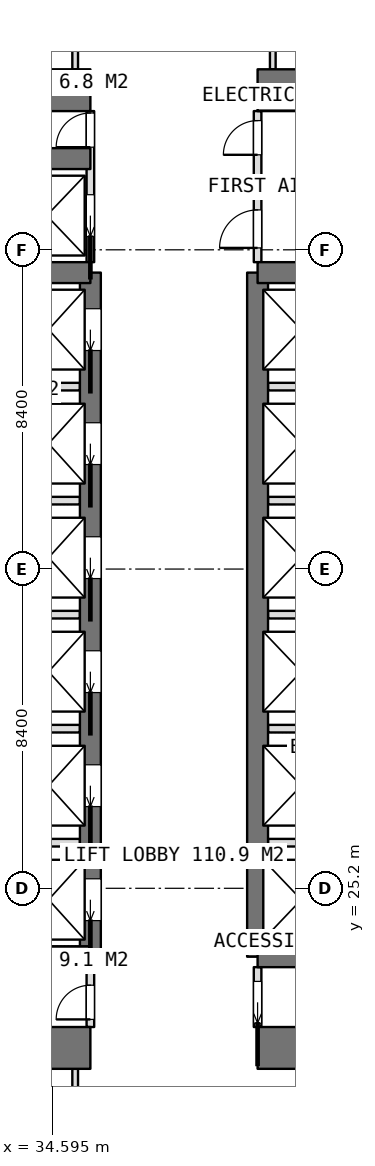
"""IFC4 building model, lengths in metres.
Left out: names, types, materials, properties, quantities, classifications, styles, units other than length and angle.
Written with IfcOpenShell. Run it as: python <this file> out.ifc"""

import sys

from ifc_helpers import new_model, si_unit, direction, frame, frame_2d, origin, place, context, subcontext, project, spatial, rectangle, extrude, element, fill, save


model = new_model("IFC4")
c1 = context("Model", 3, precision=1e-05, world=origin(), true_north=direction((0.0, 1.0)))
c2 = subcontext(c1, "Body", "Model", "MODEL_VIEW")
j1 = project(units=[si_unit("LENGTHUNIT", "METRE"), si_unit("PLANEANGLEUNIT", "RADIAN")], contexts=[c1])
p1 = place(None, origin())
s1 = spatial("IfcSite", under=j1, at=p1, CompositionType="ELEMENT")
p2 = place(p1, origin())
s2 = spatial("IfcBuilding", under=s1, at=p2, CompositionType="ELEMENT")
p3 = place(p2, frame((0.0, 0.0, 70.4)))
s3 = spatial("IfcBuildingStorey", under=s2, at=p3, CompositionType="ELEMENT", Elevation=70.4)
p4 = place(p3, frame((25.2, 21.0, 0.0), z_axis=(0.0, 0.0, 1.0), x_axis=(1.0, 0.0, 0.0)))
e1 = element("IfcWall", 1, at=p4, inside=s3, PredefinedType="SHEAR", context=c2, shape_type="SweptSolid", body=[
    extrude(rectangle(XDim=10.4, YDim=1.1, at=frame_2d((5.2, 0.0))), origin(), (0.0, 0.0, 1.0), 3.75),
])
p5 = place(p3, frame((40.0, 21.0, 0.0), z_axis=(0.0, 0.0, 1.0), x_axis=(1.0, 0.0, 0.0)))
e2 = element("IfcWall", 2, at=p5, inside=s3, PredefinedType="SHEAR", context=c2, shape_type="SweptSolid", body=[
    extrude(rectangle(XDim=10.4, YDim=1.1, at=frame_2d((5.2, 0.0))), origin(), (0.0, 0.0, 1.0), 3.75),
])
p6 = place(p3, frame((25.2, 46.2, 0.0), z_axis=(0.0, 0.0, 1.0), x_axis=(1.0, 0.0, 0.0)))
e3 = element("IfcWall", 3, at=p6, inside=s3, PredefinedType="SHEAR", context=c2, shape_type="SweptSolid", body=[
    extrude(rectangle(XDim=10.4, YDim=1.1, at=frame_2d((5.2, 0.0))), origin(), (0.0, 0.0, 1.0), 3.75),
])
p7 = place(p3, frame((40.0, 46.2, 0.0), z_axis=(0.0, 0.0, 1.0), x_axis=(1.0, 0.0, 0.0)))
e4 = element("IfcWall", 4, at=p7, inside=s3, PredefinedType="SHEAR", context=c2, shape_type="SweptSolid", body=[
    extrude(rectangle(XDim=10.4, YDim=1.1, at=frame_2d((5.2, 0.0))), origin(), (0.0, 0.0, 1.0), 3.75),
])
p8 = place(p3, frame((35.6, 23.4, 0.0), z_axis=(0.0, 0.0, 1.0), x_axis=(0.0, 1.0, 0.0)))
e5 = element("IfcWall", 5, at=p8, inside=s3, PredefinedType="SHEAR", context=c2, shape_type="SweptSolid", body=[
    extrude(rectangle(XDim=18.0, YDim=0.55, at=frame_2d((9.0, 0.0))), origin(), (0.0, 0.0, 1.0), 3.75),
])
p9 = place(p8, frame((0.95, 0.0, 0.0)))
e6 = element("IfcOpeningElement", 6, at=p9, cuts=e5, PredefinedType="OPENING", context=c2, shape_type="SweptSolid", body=[
    extrude(rectangle(XDim=1.1, YDim=2.1, at=frame_2d((0.55, 1.05))), frame((0.0, 0.285, 0.0), z_axis=(0.0, -1.0, 0.0), x_axis=(1.0, 0.0, 0.0)), (0.0, 0.0, 1.0), 0.57),
])
p10 = place(p8, frame((3.95, 0.0, 0.0)))
e7 = element("IfcOpeningElement", 7, at=p10, cuts=e5, PredefinedType="OPENING", context=c2, shape_type="SweptSolid", body=[
    extrude(rectangle(XDim=1.1, YDim=2.1, at=frame_2d((0.55, 1.05))), frame((0.0, 0.285, 0.0), z_axis=(0.0, -1.0, 0.0), x_axis=(1.0, 0.0, 0.0)), (0.0, 0.0, 1.0), 0.57),
])
p11 = place(p8, frame((6.95, 0.0, 0.0)))
e8 = element("IfcOpeningElement", 8, at=p11, cuts=e5, PredefinedType="OPENING", context=c2, shape_type="SweptSolid", body=[
    extrude(rectangle(XDim=1.1, YDim=2.1, at=frame_2d((0.55, 1.05))), frame((0.0, 0.285, 0.0), z_axis=(0.0, -1.0, 0.0), x_axis=(1.0, 0.0, 0.0)), (0.0, 0.0, 1.0), 0.57),
])
p12 = place(p8, frame((9.95, 0.0, 0.0)))
e9 = element("IfcOpeningElement", 9, at=p12, cuts=e5, PredefinedType="OPENING", context=c2, shape_type="SweptSolid", body=[
    extrude(rectangle(XDim=1.1, YDim=2.1, at=frame_2d((0.55, 1.05))), frame((0.0, 0.285, 0.0), z_axis=(0.0, -1.0, 0.0), x_axis=(1.0, 0.0, 0.0)), (0.0, 0.0, 1.0), 0.57),
])
p13 = place(p8, frame((12.95, 0.0, 0.0)))
e10 = element("IfcOpeningElement", 10, at=p13, cuts=e5, PredefinedType="OPENING", context=c2, shape_type="SweptSolid", body=[
    extrude(rectangle(XDim=1.1, YDim=2.1, at=frame_2d((0.55, 1.05))), frame((0.0, 0.285, 0.0), z_axis=(0.0, -1.0, 0.0), x_axis=(1.0, 0.0, 0.0)), (0.0, 0.0, 1.0), 0.57),
])
p14 = place(p8, frame((15.95, 0.0, 0.0)))
e11 = element("IfcOpeningElement", 11, at=p14, cuts=e5, PredefinedType="OPENING", context=c2, shape_type="SweptSolid", body=[
    extrude(rectangle(XDim=1.1, YDim=2.1, at=frame_2d((0.55, 1.05))), frame((0.0, 0.285, 0.0), z_axis=(0.0, -1.0, 0.0), x_axis=(1.0, 0.0, 0.0)), (0.0, 0.0, 1.0), 0.57),
])
p15 = place(p3, frame((40.0, 23.4, 0.0), z_axis=(0.0, 0.0, 1.0), x_axis=(0.0, 1.0, 0.0)))
e12 = element("IfcWall", 12, at=p15, inside=s3, PredefinedType="SHEAR", context=c2, shape_type="SweptSolid", body=[
    extrude(rectangle(XDim=18.0, YDim=0.55, at=frame_2d((9.0, 0.0))), origin(), (0.0, 0.0, 1.0), 3.75),
])
for number, where, z_axis, x_axis in (
    (13, (31.8, 23.4, 0.0), (0.0, 0.0, 1.0), (1.0, 0.0, 0.0)),
    (14, (31.8, 41.4, 0.0), (0.0, 0.0, 1.0), (1.0, 0.0, 0.0)),
    (15, (31.8, 44.4, 0.0), (0.0, 0.0, 1.0), (1.0, 0.0, 0.0)),
    (16, (40.0, 23.4, 0.0), (0.0, 0.0, 1.0), (1.0, 0.0, 0.0)),
    (17, (40.0, 41.4, 0.0), (0.0, 0.0, 1.0), (1.0, 0.0, 0.0)),
):
    element("IfcWall", number, at=place(p3, frame(where, z_axis=z_axis, x_axis=x_axis)), inside=s3, PredefinedType="SHEAR", context=c2, shape_type="SweptSolid", body=[
        extrude(rectangle(XDim=3.8, YDim=0.55, at=frame_2d((1.9, 0.0))), origin(), (0.0, 0.0, 1.0), 3.75),
    ])
for number, where, z_axis, x_axis in (
    (18, (32.075, 26.4, 0.0), (0.0, 0.0, 1.0), (1.0, 0.0, 0.0)),
    (19, (32.075, 29.4, 0.0), (0.0, 0.0, 1.0), (1.0, 0.0, 0.0)),
    (20, (32.075, 32.4, 0.0), (0.0, 0.0, 1.0), (1.0, 0.0, 0.0)),
    (21, (32.075, 35.4, 0.0), (0.0, 0.0, 1.0), (1.0, 0.0, 0.0)),
    (22, (32.075, 38.4, 0.0), (0.0, 0.0, 1.0), (1.0, 0.0, 0.0)),
    (23, (40.275, 26.4, 0.0), (0.0, 0.0, 1.0), (1.0, 0.0, 0.0)),
    (24, (40.275, 29.4, 0.0), (0.0, 0.0, 1.0), (1.0, 0.0, 0.0)),
    (25, (40.275, 32.4, 0.0), (0.0, 0.0, 1.0), (1.0, 0.0, 0.0)),
    (26, (40.275, 35.4, 0.0), (0.0, 0.0, 1.0), (1.0, 0.0, 0.0)),
    (27, (40.275, 38.4, 0.0), (0.0, 0.0, 1.0), (1.0, 0.0, 0.0)),
):
    element("IfcWall", number, at=place(p3, frame(where, z_axis=z_axis, x_axis=x_axis)), inside=s3, PredefinedType="PARTITIONING", context=c2, shape_type="SweptSolid", body=[
        extrude(rectangle(XDim=3.25, YDim=0.2, at=frame_2d((1.625, 0.0))), origin(), (0.0, 0.0, 1.0), 3.5),
    ])
p16 = place(p3, frame((40.0, 21.55, 0.0), z_axis=(0.0, 0.0, 1.0), x_axis=(0.0, 1.0, 0.0)))
e28 = element("IfcWall", 28, at=p16, inside=s3, PredefinedType="PARTITIONING", context=c2, shape_type="SweptSolid", body=[
    extrude(rectangle(XDim=1.575, YDim=0.2, at=frame_2d((0.788, 0.0))), origin(), (0.0, 0.0, 1.0), 3.5),
])
p17 = place(p16, frame((0.1, 0.0, 0.0)))
e29 = element("IfcOpeningElement", 29, at=p17, cuts=e28, PredefinedType="OPENING", context=c2, shape_type="SweptSolid", body=[
    extrude(rectangle(XDim=1.1, YDim=2.1, at=frame_2d((0.55, 1.05))), frame((0.0, 0.11, 0.0), z_axis=(0.0, -1.0, 0.0), x_axis=(1.0, 0.0, 0.0)), (0.0, 0.0, 1.0), 0.22),
])
p18 = place(p3, frame((40.0, 41.675, 0.0), z_axis=(0.0, 0.0, 1.0), x_axis=(0.0, 1.0, 0.0)))
e30 = element("IfcWall", 30, at=p18, inside=s3, PredefinedType="PARTITIONING", context=c2, shape_type="SweptSolid", body=[
    extrude(rectangle(XDim=3.975, YDim=0.2, at=frame_2d((1.987, 0.0))), origin(), (0.0, 0.0, 1.0), 3.5),
])
p19 = place(p18, frame((2.825, 0.0, 0.0)))
e31 = element("IfcOpeningElement", 31, at=p19, cuts=e30, PredefinedType="OPENING", context=c2, shape_type="SweptSolid", body=[
    extrude(rectangle(XDim=0.9, YDim=2.1, at=frame_2d((0.45, 1.05))), frame((0.0, 0.11, 0.0), z_axis=(0.0, -1.0, 0.0), x_axis=(1.0, 0.0, 0.0)), (0.0, 0.0, 1.0), 0.22),
])
p20 = place(p18, frame((0.375, 0.0, 0.0)))
e32 = element("IfcOpeningElement", 32, at=p20, cuts=e30, PredefinedType="OPENING", context=c2, shape_type="SweptSolid", body=[
    extrude(rectangle(XDim=1.0, YDim=2.1, at=frame_2d((0.5, 1.05))), frame((0.0, 0.11, 0.0), z_axis=(0.0, -1.0, 0.0), x_axis=(1.0, 0.0, 0.0)), (0.0, 0.0, 1.0), 0.22),
])
p21 = place(p3, frame((35.6, 41.675, 0.0), z_axis=(0.0, 0.0, 1.0), x_axis=(0.0, 1.0, 0.0)))
e33 = element("IfcWall", 33, at=p21, inside=s3, PredefinedType="PARTITIONING", context=c2, shape_type="SweptSolid", body=[
    extrude(rectangle(XDim=3.975, YDim=0.2, at=frame_2d((1.987, 0.0))), origin(), (0.0, 0.0, 1.0), 3.5),
])
p22 = place(p21, frame((3.025, 0.0, 0.0)))
e34 = element("IfcOpeningElement", 34, at=p22, cuts=e33, PredefinedType="OPENING", context=c2, shape_type="SweptSolid", body=[
    extrude(rectangle(XDim=0.9, YDim=2.1, at=frame_2d((0.45, 1.05))), frame((0.0, 0.11, 0.0), z_axis=(0.0, -1.0, 0.0), x_axis=(1.0, 0.0, 0.0)), (0.0, 0.0, 1.0), 0.22),
])
p23 = place(p21, frame((0.675, 0.0, 0.0)))
e35 = element("IfcOpeningElement", 35, at=p23, cuts=e33, PredefinedType="OPENING", context=c2, shape_type="SweptSolid", body=[
    extrude(rectangle(XDim=1.1, YDim=2.1, at=frame_2d((0.55, 1.05))), frame((0.0, 0.11, 0.0), z_axis=(0.0, -1.0, 0.0), x_axis=(1.0, 0.0, 0.0)), (0.0, 0.0, 1.0), 0.22),
])
p24 = place(p3, frame((35.6, 21.55, 0.0), z_axis=(0.0, 0.0, 1.0), x_axis=(0.0, 1.0, 0.0)))
e36 = element("IfcWall", 36, at=p24, inside=s3, PredefinedType="PARTITIONING", context=c2, shape_type="SweptSolid", body=[
    extrude(rectangle(XDim=1.575, YDim=0.2, at=frame_2d((0.788, 0.0))), origin(), (0.0, 0.0, 1.0), 3.5),
])
p25 = place(p24, frame((0.2, 0.0, 0.0)))
e37 = element("IfcOpeningElement", 37, at=p25, cuts=e36, PredefinedType="OPENING", context=c2, shape_type="SweptSolid", body=[
    extrude(rectangle(XDim=0.9, YDim=2.1, at=frame_2d((0.45, 1.05))), frame((0.0, 0.11, 0.0), z_axis=(0.0, -1.0, 0.0), x_axis=(1.0, 0.0, 0.0)), (0.0, 0.0, 1.0), 0.22),
])
p26 = place(p3, frame((40.0, 43.7, 0.0), z_axis=(0.0, 0.0, 1.0), x_axis=(1.0, 0.0, 0.0)))
e38 = element("IfcWall", 38, at=p26, inside=s3, PredefinedType="PARTITIONING", context=c2, shape_type="SweptSolid", body=[
    extrude(rectangle(XDim=3.525, YDim=0.2, at=frame_2d((1.762, 0.0))), origin(), (0.0, 0.0, 1.0), 3.5),
])
for number, where, z_axis, x_axis in (
    (39, (40.4, 46.75, 0.0), (0.0, 0.0, 1.0), (0.0, 1.0, 0.0)),
    (40, (35.2, 46.75, 0.0), (0.0, 0.0, 1.0), (0.0, 1.0, 0.0)),
    (41, (35.2, 17.875, 0.0), (0.0, 0.0, 1.0), (0.0, 1.0, 0.0)),
):
    element("IfcWall", number, at=place(p3, frame(where, z_axis=z_axis, x_axis=x_axis)), inside=s3, PredefinedType="PARTITIONING", context=c2, shape_type="SweptSolid", body=[
        extrude(rectangle(XDim=2.575, YDim=0.15, at=frame_2d((1.288, 0.0))), origin(), (0.0, 0.0, 1.0), 3.5),
    ])
p27 = place(p17, origin())
e42 = element("IfcDoor", 42, at=p27, inside=s3, OperationType="SLIDING_TO_LEFT", PredefinedType="DOOR", context=c2, shape_type="SweptSolid", body=[
    extrude(rectangle(XDim=1.1, YDim=2.1, at=frame_2d((0.55, 1.05))), frame((0.0, 0.025, 0.0), z_axis=(0.0, -1.0, 0.0), x_axis=(1.0, 0.0, 0.0)), (0.0, 0.0, 1.0), 0.05),
])
fill(e29, e42)
p28 = place(p25, origin())
e43 = element("IfcDoor", 43, at=p28, inside=s3, OperationType="SINGLE_SWING_LEFT", PredefinedType="DOOR", context=c2, shape_type="SweptSolid", body=[
    extrude(rectangle(XDim=0.9, YDim=2.1, at=frame_2d((0.45, 1.05))), frame((0.0, 0.025, 0.0), z_axis=(0.0, -1.0, 0.0), x_axis=(1.0, 0.0, 0.0)), (0.0, 0.0, 1.0), 0.05),
])
fill(e37, e43)
p29 = place(p19, origin())
e44 = element("IfcDoor", 44, at=p29, inside=s3, OperationType="SINGLE_SWING_LEFT", PredefinedType="DOOR", context=c2, shape_type="SweptSolid", body=[
    extrude(rectangle(XDim=0.9, YDim=2.1, at=frame_2d((0.45, 1.05))), frame((0.0, 0.025, 0.0), z_axis=(0.0, -1.0, 0.0), x_axis=(1.0, 0.0, 0.0)), (0.0, 0.0, 1.0), 0.05),
])
fill(e31, e44)
p30 = place(p20, origin())
e45 = element("IfcDoor", 45, at=p30, inside=s3, OperationType="SINGLE_SWING_LEFT", PredefinedType="DOOR", context=c2, shape_type="SweptSolid", body=[
    extrude(rectangle(XDim=1.0, YDim=2.1, at=frame_2d((0.5, 1.05))), frame((0.0, 0.025, 0.0), z_axis=(0.0, -1.0, 0.0), x_axis=(1.0, 0.0, 0.0)), (0.0, 0.0, 1.0), 0.05),
])
fill(e32, e45)
p31 = place(p22, origin())
e46 = element("IfcDoor", 46, at=p31, inside=s3, OperationType="SINGLE_SWING_LEFT", PredefinedType="DOOR", context=c2, shape_type="SweptSolid", body=[
    extrude(rectangle(XDim=0.9, YDim=2.1, at=frame_2d((0.45, 1.05))), frame((0.0, 0.025, 0.0), z_axis=(0.0, -1.0, 0.0), x_axis=(1.0, 0.0, 0.0)), (0.0, 0.0, 1.0), 0.05),
])
fill(e34, e46)
p32 = place(p9, origin())
e47 = element("IfcDoor", 47, at=p32, inside=s3, OperationType="SLIDING_TO_LEFT", PredefinedType="USERDEFINED", context=c2, shape_type="SweptSolid", body=[
    extrude(rectangle(XDim=1.1, YDim=2.1, at=frame_2d((0.55, 1.05))), frame((0.0, 0.025, 0.0), z_axis=(0.0, -1.0, 0.0), x_axis=(1.0, 0.0, 0.0)), (0.0, 0.0, 1.0), 0.05),
])
fill(e6, e47)
p33 = place(p10, origin())
e48 = element("IfcDoor", 48, at=p33, inside=s3, OperationType="SLIDING_TO_LEFT", PredefinedType="USERDEFINED", context=c2, shape_type="SweptSolid", body=[
    extrude(rectangle(XDim=1.1, YDim=2.1, at=frame_2d((0.55, 1.05))), frame((0.0, 0.025, 0.0), z_axis=(0.0, -1.0, 0.0), x_axis=(1.0, 0.0, 0.0)), (0.0, 0.0, 1.0), 0.05),
])
fill(e7, e48)
p34 = place(p11, origin())
e49 = element("IfcDoor", 49, at=p34, inside=s3, OperationType="SLIDING_TO_LEFT", PredefinedType="USERDEFINED", context=c2, shape_type="SweptSolid", body=[
    extrude(rectangle(XDim=1.1, YDim=2.1, at=frame_2d((0.55, 1.05))), frame((0.0, 0.025, 0.0), z_axis=(0.0, -1.0, 0.0), x_axis=(1.0, 0.0, 0.0)), (0.0, 0.0, 1.0), 0.05),
])
fill(e8, e49)
p35 = place(p12, origin())
e50 = element("IfcDoor", 50, at=p35, inside=s3, OperationType="SLIDING_TO_LEFT", PredefinedType="USERDEFINED", context=c2, shape_type="SweptSolid", body=[
    extrude(rectangle(XDim=1.1, YDim=2.1, at=frame_2d((0.55, 1.05))), frame((0.0, 0.025, 0.0), z_axis=(0.0, -1.0, 0.0), x_axis=(1.0, 0.0, 0.0)), (0.0, 0.0, 1.0), 0.05),
])
fill(e9, e50)
p36 = place(p13, origin())
e51 = element("IfcDoor", 51, at=p36, inside=s3, OperationType="SLIDING_TO_LEFT", PredefinedType="USERDEFINED", context=c2, shape_type="SweptSolid", body=[
    extrude(rectangle(XDim=1.1, YDim=2.1, at=frame_2d((0.55, 1.05))), frame((0.0, 0.025, 0.0), z_axis=(0.0, -1.0, 0.0), x_axis=(1.0, 0.0, 0.0)), (0.0, 0.0, 1.0), 0.05),
])
fill(e10, e51)
p37 = place(p14, origin())
e52 = element("IfcDoor", 52, at=p37, inside=s3, OperationType="SLIDING_TO_LEFT", PredefinedType="USERDEFINED", context=c2, shape_type="SweptSolid", body=[
    extrude(rectangle(XDim=1.1, YDim=2.1, at=frame_2d((0.55, 1.05))), frame((0.0, 0.025, 0.0), z_axis=(0.0, -1.0, 0.0), x_axis=(1.0, 0.0, 0.0)), (0.0, 0.0, 1.0), 0.05),
])
fill(e11, e52)
p38 = place(p23, origin())
e53 = element("IfcDoor", 53, at=p38, inside=s3, OperationType="SLIDING_TO_LEFT", PredefinedType="USERDEFINED", context=c2, shape_type="SweptSolid", body=[
    extrude(rectangle(XDim=1.1, YDim=2.1, at=frame_2d((0.55, 1.05))), frame((0.0, 0.025, 0.0), z_axis=(0.0, -1.0, 0.0), x_axis=(1.0, 0.0, 0.0)), (0.0, 0.0, 1.0), 0.05),
])
fill(e35, e53)
save(model, sys.argv[1])
